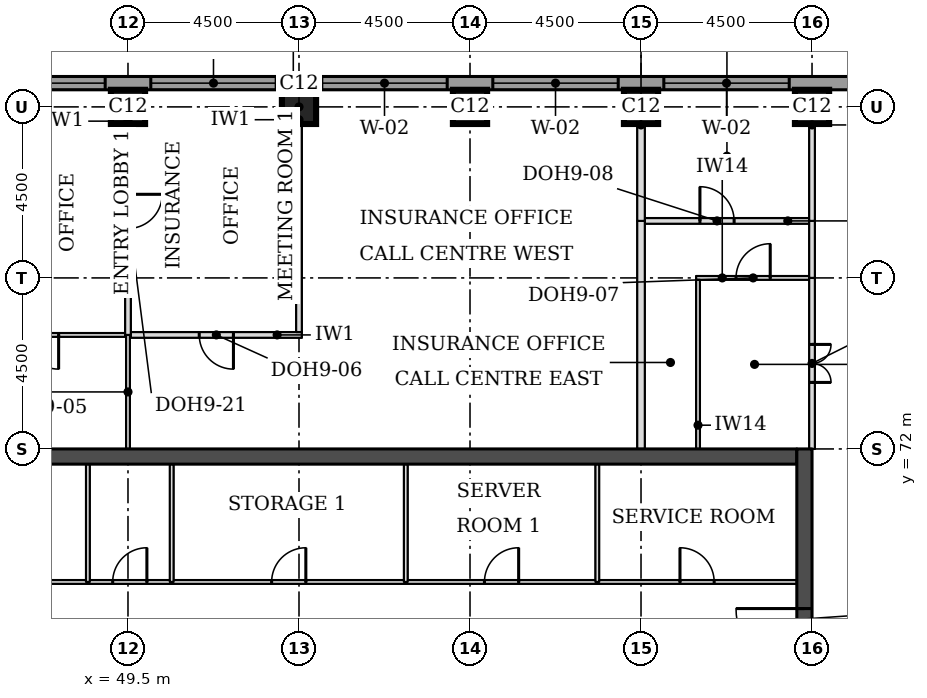
"""IFC4 building model, lengths in metres.
Left out: names, types, materials, properties, quantities, classifications, styles, units other than length and angle.
Written with IfcOpenShell. Run it as: python <this file> out.ifc"""

import sys

from ifc_helpers import new_model, si_unit, direction, frame, frame_2d, origin, origin_2d, place, context, subcontext, project, spatial, rectangle, extrude, element, fill, save


model = new_model("IFC4")
c1 = context("Model", 3, precision=1e-05, world=origin(), true_north=direction((0.0, 1.0)))
c2 = subcontext(c1, "Body", "Model", "MODEL_VIEW")
j1 = project(units=[si_unit("LENGTHUNIT", "METRE"), si_unit("PLANEANGLEUNIT", "RADIAN")], contexts=[c1])
p1 = place(None, origin())
s1 = spatial("IfcSite", under=j1, at=p1, CompositionType="ELEMENT")
p2 = place(p1, origin())
s2 = spatial("IfcBuilding", under=s1, at=p2, CompositionType="ELEMENT")
p3 = place(p2, frame((0.0, 0.0, 219.3)))
s3 = spatial("IfcBuildingStorey", under=s2, at=p3, CompositionType="ELEMENT", Elevation=219.3)
for number, where, z_axis, x_axis in (
    (1, (49.5, 81.0, 0.0), (0.0, 0.0, 1.0), (1.0, 0.0, 0.0)),
    (2, (54.0, 81.0, 0.0), (0.0, 0.0, 1.0), (1.0, 0.0, 0.0)),
    (3, (58.5, 81.0, 0.0), (0.0, 0.0, 1.0), (1.0, 0.0, 0.0)),
    (4, (63.0, 81.0, 0.0), (0.0, 0.0, 1.0), (1.0, 0.0, 0.0)),
    (5, (67.5, 81.0, 0.0), (0.0, 0.0, 1.0), (1.0, 0.0, 0.0)),
):
    element("IfcColumn", number, at=place(p3, frame(where, z_axis=z_axis, x_axis=x_axis)), inside=s3, PredefinedType="COLUMN", context=c2, shape_type="SweptSolid", body=[
        extrude(rectangle(XDim=0.9, YDim=0.9, at=origin_2d()), origin(), (0.0, 0.0, 1.0), 3.7),
    ])
p4 = place(p3, frame((45.4, 71.8, 0.0), z_axis=(0.0, 0.0, 1.0), x_axis=(1.0, 0.0, 0.0)))
e6 = element("IfcWall", 6, at=p4, inside=s3, PredefinedType="SHEAR", context=c2, shape_type="SweptSolid", body=[
    extrude(rectangle(XDim=21.7, YDim=0.4, at=frame_2d((10.85, 0.0))), origin(), (0.0, 0.0, 1.0), 3.7),
])
p5 = place(p3, frame((67.3, 49.5, 0.0), z_axis=(0.0, 0.0, 1.0), x_axis=(0.0, 1.0, 0.0)))
e7 = element("IfcWall", 7, at=p5, inside=s3, PredefinedType="SHEAR", context=c2, shape_type="SweptSolid", body=[
    extrude(rectangle(XDim=22.5, YDim=0.4, at=frame_2d((11.25, 0.0))), origin(), (0.0, 0.0, 1.0), 3.7),
])
p6 = place(p5, frame((4.2, 0.0, 0.0)))
e8 = element("IfcOpeningElement", 8, at=p6, cuts=e7, PredefinedType="OPENING", context=c2, shape_type="SweptSolid", body=[
    extrude(rectangle(XDim=1.8, YDim=2.1, at=frame_2d((0.9, 1.05))), frame((0.0, 0.21, 0.0), z_axis=(0.0, -1.0, 0.0), x_axis=(1.0, 0.0, 0.0)), (0.0, 0.0, 1.0), 0.42),
])
p7 = place(p5, frame((6.9, 0.0, 0.0)))
e9 = element("IfcOpeningElement", 9, at=p7, cuts=e7, PredefinedType="OPENING", context=c2, shape_type="SweptSolid", body=[
    extrude(rectangle(XDim=1.1, YDim=2.1, at=frame_2d((0.55, 1.05))), frame((0.0, 0.21, 0.0), z_axis=(0.0, -1.0, 0.0), x_axis=(1.0, 0.0, 0.0)), (0.0, 0.0, 1.0), 0.42),
])
p8 = place(p5, frame((13.6, 0.0, 0.0)))
e10 = element("IfcOpeningElement", 10, at=p8, cuts=e7, PredefinedType="OPENING", context=c2, shape_type="SweptSolid", body=[
    extrude(rectangle(XDim=1.1, YDim=2.1, at=frame_2d((0.55, 1.05))), frame((0.0, 0.21, 0.0), z_axis=(0.0, -1.0, 0.0), x_axis=(1.0, 0.0, 0.0)), (0.0, 0.0, 1.0), 0.42),
])
p9 = place(p5, frame((16.5, 0.0, 0.0)))
e11 = element("IfcOpeningElement", 11, at=p9, cuts=e7, PredefinedType="OPENING", context=c2, shape_type="SweptSolid", body=[
    extrude(rectangle(XDim=1.8, YDim=2.1, at=frame_2d((0.9, 1.05))), frame((0.0, 0.21, 0.0), z_axis=(0.0, -1.0, 0.0), x_axis=(1.0, 0.0, 0.0)), (0.0, 0.0, 1.0), 0.42),
])
p10 = place(p3, frame((72.331, 81.625, 0.0), z_axis=(0.0, 0.0, 1.0), x_axis=(-1.0, 0.0, 0.0)))
e12 = element("IfcWall", 12, at=p10, inside=s3, PredefinedType="STANDARD", context=c2, shape_type="SweptSolid", body=[
    extrude(rectangle(XDim=32.163, YDim=0.35, at=frame_2d((16.081, 0.0))), origin(), (0.0, 0.0, 1.0), 3.525),
])
p11 = place(p10, frame((5.431, 0.0, 0.9)))
e13 = element("IfcOpeningElement", 13, at=p11, cuts=e12, PredefinedType="OPENING", context=c2, shape_type="SweptSolid", body=[
    extrude(rectangle(XDim=3.3, YDim=1.9, at=frame_2d((1.65, 0.95))), frame((0.0, 0.185, 0.0), z_axis=(0.0, -1.0, 0.0), x_axis=(1.0, 0.0, 0.0)), (0.0, 0.0, 1.0), 0.37),
])
p12 = place(p10, frame((9.931, 0.0, 0.9)))
e14 = element("IfcOpeningElement", 14, at=p12, cuts=e12, PredefinedType="OPENING", context=c2, shape_type="SweptSolid", body=[
    extrude(rectangle(XDim=3.3, YDim=1.9, at=frame_2d((1.65, 0.95))), frame((0.0, 0.185, 0.0), z_axis=(0.0, -1.0, 0.0), x_axis=(1.0, 0.0, 0.0)), (0.0, 0.0, 1.0), 0.37),
])
p13 = place(p10, frame((14.431, 0.0, 0.9)))
e15 = element("IfcOpeningElement", 15, at=p13, cuts=e12, PredefinedType="OPENING", context=c2, shape_type="SweptSolid", body=[
    extrude(rectangle(XDim=3.3, YDim=1.9, at=frame_2d((1.65, 0.95))), frame((0.0, 0.185, 0.0), z_axis=(0.0, -1.0, 0.0), x_axis=(1.0, 0.0, 0.0)), (0.0, 0.0, 1.0), 0.37),
])
p14 = place(p10, frame((18.931, 0.0, 0.9)))
e16 = element("IfcOpeningElement", 16, at=p14, cuts=e12, PredefinedType="OPENING", context=c2, shape_type="SweptSolid", body=[
    extrude(rectangle(XDim=3.3, YDim=1.9, at=frame_2d((1.65, 0.95))), frame((0.0, 0.185, 0.0), z_axis=(0.0, -1.0, 0.0), x_axis=(1.0, 0.0, 0.0)), (0.0, 0.0, 1.0), 0.37),
])
p15 = place(p10, frame((23.431, 0.0, 0.9)))
e17 = element("IfcOpeningElement", 17, at=p15, cuts=e12, PredefinedType="OPENING", context=c2, shape_type="SweptSolid", body=[
    extrude(rectangle(XDim=3.3, YDim=1.9, at=frame_2d((1.65, 0.95))), frame((0.0, 0.185, 0.0), z_axis=(0.0, -1.0, 0.0), x_axis=(1.0, 0.0, 0.0)), (0.0, 0.0, 1.0), 0.37),
])
p16 = place(p3, frame((45.075, 75.0, 0.0), z_axis=(0.0, 0.0, 1.0), x_axis=(1.0, 0.0, 0.0)))
e18 = element("IfcWall", 18, at=p16, inside=s3, PredefinedType="PARTITIONING", context=c2, shape_type="SweptSolid", body=[
    extrude(rectangle(XDim=4.35, YDim=0.1, at=frame_2d((2.175, 0.0))), origin(), (0.0, 0.0, 1.0), 3.55),
])
p17 = place(p16, frame((1.7, 0.0, 0.0)))
e19 = element("IfcOpeningElement", 19, at=p17, cuts=e18, PredefinedType="OPENING", context=c2, shape_type="SweptSolid", body=[
    extrude(rectangle(XDim=0.9, YDim=2.1, at=frame_2d((0.45, 1.05))), frame((0.0, 0.06, 0.0), z_axis=(0.0, -1.0, 0.0), x_axis=(1.0, 0.0, 0.0)), (0.0, 0.0, 1.0), 0.12),
])
p18 = place(p3, frame((49.575, 75.0, 0.0), z_axis=(0.0, 0.0, 1.0), x_axis=(1.0, 0.0, 0.0)))
e20 = element("IfcWall", 20, at=p18, inside=s3, PredefinedType="PARTITIONING", context=c2, shape_type="SweptSolid", body=[
    extrude(rectangle(XDim=4.5, YDim=0.15, at=frame_2d((2.25, 0.0))), origin(), (0.0, 0.0, 1.0), 3.55),
])
p19 = place(p18, frame((1.8, 0.0, 0.0)))
e21 = element("IfcOpeningElement", 21, at=p19, cuts=e20, PredefinedType="OPENING", context=c2, shape_type="SweptSolid", body=[
    extrude(rectangle(XDim=0.9, YDim=2.1, at=frame_2d((0.45, 1.05))), frame((0.0, 0.085, 0.0), z_axis=(0.0, -1.0, 0.0), x_axis=(1.0, 0.0, 0.0)), (0.0, 0.0, 1.0), 0.17),
])
p20 = place(p3, frame((64.45, 76.5, 0.0), z_axis=(0.0, 0.0, 1.0), x_axis=(1.0, 0.0, 0.0)))
e22 = element("IfcWall", 22, at=p20, inside=s3, PredefinedType="PARTITIONING", context=c2, shape_type="SweptSolid", body=[
    extrude(rectangle(XDim=2.975, YDim=0.1, at=frame_2d((1.488, 0.0))), origin(), (0.0, 0.0, 1.0), 3.55),
])
p21 = place(p20, frame((1.05, 0.0, 0.0)))
e23 = element("IfcOpeningElement", 23, at=p21, cuts=e22, PredefinedType="OPENING", context=c2, shape_type="SweptSolid", body=[
    extrude(rectangle(XDim=0.9, YDim=2.1, at=frame_2d((0.45, 1.05))), frame((0.0, 0.06, 0.0), z_axis=(0.0, -1.0, 0.0), x_axis=(1.0, 0.0, 0.0)), (0.0, 0.0, 1.0), 0.12),
])
p22 = place(p3, frame((63.1, 78.0, 0.0), z_axis=(0.0, 0.0, 1.0), x_axis=(1.0, 0.0, 0.0)))
e24 = element("IfcWall", 24, at=p22, inside=s3, PredefinedType="PARTITIONING", context=c2, shape_type="SweptSolid", body=[
    extrude(rectangle(XDim=4.325, YDim=0.15, at=frame_2d((2.163, 0.0))), origin(), (0.0, 0.0, 1.0), 3.55),
])
p23 = place(p22, frame((1.45, 0.0, 0.0)))
e25 = element("IfcOpeningElement", 25, at=p23, cuts=e24, PredefinedType="OPENING", context=c2, shape_type="SweptSolid", body=[
    extrude(rectangle(XDim=0.9, YDim=2.1, at=frame_2d((0.45, 1.05))), frame((0.0, 0.085, 0.0), z_axis=(0.0, -1.0, 0.0), x_axis=(1.0, 0.0, 0.0)), (0.0, 0.0, 1.0), 0.17),
])
p24 = place(p3, frame((49.5, 72.0, 0.0), z_axis=(0.0, 0.0, 1.0), x_axis=(0.0, 1.0, 0.0)))
e26 = element("IfcWall", 26, at=p24, inside=s3, PredefinedType="PARTITIONING", context=c2, shape_type="SweptSolid", body=[
    extrude(rectangle(XDim=3.0, YDim=0.1, at=frame_2d((1.5, 0.0))), origin(), (0.0, 0.0, 1.0), 3.55),
])
p25 = place(p3, frame((63.0, 72.0, 0.0), z_axis=(0.0, 0.0, 1.0), x_axis=(0.0, 1.0, 0.0)))
e27 = element("IfcWall", 27, at=p25, inside=s3, PredefinedType="PARTITIONING", context=c2, shape_type="SweptSolid", body=[
    extrude(rectangle(XDim=6.0, YDim=0.2, at=frame_2d((3.0, 0.0))), origin(), (0.0, 0.0, 1.0), 3.55),
])
p26 = place(p3, frame((64.5, 72.0, 0.0), z_axis=(0.0, 0.0, 1.0), x_axis=(0.0, 1.0, 0.0)))
e28 = element("IfcWall", 28, at=p26, inside=s3, PredefinedType="PARTITIONING", context=c2, shape_type="SweptSolid", body=[
    extrude(rectangle(XDim=4.45, YDim=0.1, at=frame_2d((2.225, 0.0))), origin(), (0.0, 0.0, 1.0), 3.55),
])
p27 = place(p3, frame((67.5, 72.0, 0.0), z_axis=(0.0, 0.0, 1.0), x_axis=(0.0, 1.0, 0.0)))
e29 = element("IfcWall", 29, at=p27, inside=s3, PredefinedType="PARTITIONING", context=c2, shape_type="SweptSolid", body=[
    extrude(rectangle(XDim=4.5, YDim=0.15, at=frame_2d((2.25, 0.0))), origin(), (0.0, 0.0, 1.0), 3.022),
])
p28 = place(p27, frame((1.75, 0.0, 0.0)))
e30 = element("IfcOpeningElement", 30, at=p28, cuts=e29, PredefinedType="OPENING", context=c2, shape_type="SweptSolid", body=[
    extrude(rectangle(XDim=1.0, YDim=2.1, at=frame_2d((0.5, 1.05))), frame((0.0, 0.085, 0.0), z_axis=(0.0, -1.0, 0.0), x_axis=(1.0, 0.0, 0.0)), (0.0, 0.0, 1.0), 0.17),
])
p29 = place(p3, frame((49.5, 75.0, 0.0), z_axis=(0.0, 0.0, 1.0), x_axis=(0.0, 1.0, 0.0)))
e31 = element("IfcWall", 31, at=p29, inside=s3, PredefinedType="PARTITIONING", context=c2, shape_type="SweptSolid", body=[
    extrude(rectangle(XDim=6.45, YDim=0.15, at=frame_2d((3.225, 0.0))), origin(), (0.0, 0.0, 1.0), 3.55),
])
p30 = place(p29, frame((2.8, 0.0, 0.0)))
e32 = element("IfcOpeningElement", 32, at=p30, cuts=e31, PredefinedType="OPENING", context=c2, shape_type="SweptSolid", body=[
    extrude(rectangle(XDim=0.9, YDim=2.1, at=frame_2d((0.45, 1.05))), frame((0.0, 0.085, 0.0), z_axis=(0.0, -1.0, 0.0), x_axis=(1.0, 0.0, 0.0)), (0.0, 0.0, 1.0), 0.17),
])
p31 = place(p3, frame((54.0, 75.075, 0.0), z_axis=(0.0, 0.0, 1.0), x_axis=(0.0, 1.0, 0.0)))
e33 = element("IfcWall", 33, at=p31, inside=s3, PredefinedType="PARTITIONING", context=c2, shape_type="SweptSolid", body=[
    extrude(rectangle(XDim=6.375, YDim=0.15, at=frame_2d((3.188, 0.0))), origin(), (0.0, 0.0, 1.0), 3.55),
])
p32 = place(p3, frame((67.5, 76.5, 0.0), z_axis=(0.0, 0.0, 1.0), x_axis=(0.0, 1.0, 0.0)))
e34 = element("IfcWall", 34, at=p32, inside=s3, PredefinedType="PARTITIONING", context=c2, shape_type="SweptSolid", body=[
    extrude(rectangle(XDim=1.5, YDim=0.15, at=frame_2d((0.75, 0.0))), origin(), (0.0, 0.0, 1.0), 3.022),
])
p33 = place(p3, frame((63.0, 78.0, 0.0), z_axis=(0.0, 0.0, 1.0), x_axis=(0.0, 1.0, 0.0)))
e35 = element("IfcWall", 35, at=p33, inside=s3, PredefinedType="PARTITIONING", context=c2, shape_type="SweptSolid", body=[
    extrude(rectangle(XDim=3.45, YDim=0.2, at=frame_2d((1.725, 0.0))), origin(), (0.0, 0.0, 1.0), 3.55),
])
p34 = place(p3, frame((67.5, 78.0, 0.0), z_axis=(0.0, 0.0, 1.0), x_axis=(0.0, 1.0, 0.0)))
e36 = element("IfcWall", 36, at=p34, inside=s3, PredefinedType="PARTITIONING", context=c2, shape_type="SweptSolid", body=[
    extrude(rectangle(XDim=3.45, YDim=0.15, at=frame_2d((1.725, 0.0))), origin(), (0.0, 0.0, 1.0), 3.022),
])
p35 = place(p3, frame((45.4, 68.5, 0.0), z_axis=(0.0, 0.0, 1.0), x_axis=(1.0, 0.0, 0.0)))
e37 = element("IfcWall", 37, at=p35, inside=s3, PredefinedType="PARTITIONING", context=c2, shape_type="SweptSolid", body=[
    extrude(rectangle(XDim=21.7, YDim=0.1, at=frame_2d((10.85, 0.0))), origin(), (0.0, 0.0, 1.0), 3.55),
])
p36 = place(p35, frame((18.625, 0.0, 0.0)))
e38 = element("IfcOpeningElement", 38, at=p36, cuts=e37, PredefinedType="OPENING", context=c2, shape_type="SweptSolid", body=[
    extrude(rectangle(XDim=0.9, YDim=2.1, at=frame_2d((0.45, 1.05))), frame((0.0, 0.06, 0.0), z_axis=(0.0, -1.0, 0.0), x_axis=(1.0, 0.0, 0.0)), (0.0, 0.0, 1.0), 0.12),
])
p37 = place(p35, frame((1.073, 0.0, 0.0)))
e39 = element("IfcOpeningElement", 39, at=p37, cuts=e37, PredefinedType="OPENING", context=c2, shape_type="SweptSolid", body=[
    extrude(rectangle(XDim=0.9, YDim=2.1, at=frame_2d((0.45, 1.05))), frame((0.0, 0.06, 0.0), z_axis=(0.0, -1.0, 0.0), x_axis=(1.0, 0.0, 0.0)), (0.0, 0.0, 1.0), 0.12),
])
p38 = place(p35, frame((3.698, 0.0, 0.0)))
e40 = element("IfcOpeningElement", 40, at=p38, cuts=e37, PredefinedType="OPENING", context=c2, shape_type="SweptSolid", body=[
    extrude(rectangle(XDim=0.9, YDim=2.1, at=frame_2d((0.45, 1.05))), frame((0.0, 0.06, 0.0), z_axis=(0.0, -1.0, 0.0), x_axis=(1.0, 0.0, 0.0)), (0.0, 0.0, 1.0), 0.12),
])
p39 = place(p35, frame((13.48, 0.0, 0.0)))
e41 = element("IfcOpeningElement", 41, at=p39, cuts=e37, PredefinedType="OPENING", context=c2, shape_type="SweptSolid", body=[
    extrude(rectangle(XDim=0.9, YDim=2.1, at=frame_2d((0.45, 1.05))), frame((0.0, 0.06, 0.0), z_axis=(0.0, -1.0, 0.0), x_axis=(1.0, 0.0, 0.0)), (0.0, 0.0, 1.0), 0.12),
])
p40 = place(p35, frame((7.88, 0.0, 0.0)))
e42 = element("IfcOpeningElement", 42, at=p40, cuts=e37, PredefinedType="OPENING", context=c2, shape_type="SweptSolid", body=[
    extrude(rectangle(XDim=0.9, YDim=2.1, at=frame_2d((0.45, 1.05))), frame((0.0, 0.06, 0.0), z_axis=(0.0, -1.0, 0.0), x_axis=(1.0, 0.0, 0.0)), (0.0, 0.0, 1.0), 0.12),
])
for number, where, z_axis, x_axis in (
    (43, (48.445, 68.5, 0.0), (0.0, 0.0, 1.0), (0.0, 1.0, 0.0)),
    (44, (50.65, 68.5, 0.0), (0.0, 0.0, 1.0), (0.0, 1.0, 0.0)),
    (45, (56.81, 68.5, 0.0), (0.0, 0.0, 1.0), (0.0, 1.0, 0.0)),
    (46, (61.85, 68.5, 0.0), (0.0, 0.0, 1.0), (0.0, 1.0, 0.0)),
):
    element("IfcWall", number, at=place(p3, frame(where, z_axis=z_axis, x_axis=x_axis)), inside=s3, PredefinedType="PARTITIONING", context=c2, shape_type="SweptSolid", body=[
        extrude(rectangle(XDim=3.1, YDim=0.1, at=frame_2d((1.55, 0.0))), origin(), (0.0, 0.0, 1.0), 3.55),
    ])
p41 = place(p11, origin())
e47 = element("IfcWindow", 47, at=p41, inside=s3, PartitioningType="SINGLE_PANEL", PredefinedType="WINDOW", context=c2, shape_type="SweptSolid", body=[
    extrude(rectangle(XDim=3.3, YDim=1.9, at=frame_2d((1.65, 0.95))), frame((0.0, 0.085, 0.0), z_axis=(0.0, -1.0, 0.0), x_axis=(1.0, 0.0, 0.0)), (0.0, 0.0, 1.0), 0.06),
])
fill(e13, e47)
p42 = place(p12, origin())
e48 = element("IfcWindow", 48, at=p42, inside=s3, PartitioningType="SINGLE_PANEL", PredefinedType="WINDOW", context=c2, shape_type="SweptSolid", body=[
    extrude(rectangle(XDim=3.3, YDim=1.9, at=frame_2d((1.65, 0.95))), frame((0.0, 0.085, 0.0), z_axis=(0.0, -1.0, 0.0), x_axis=(1.0, 0.0, 0.0)), (0.0, 0.0, 1.0), 0.06),
])
fill(e14, e48)
p43 = place(p13, origin())
e49 = element("IfcWindow", 49, at=p43, inside=s3, PartitioningType="SINGLE_PANEL", PredefinedType="WINDOW", context=c2, shape_type="SweptSolid", body=[
    extrude(rectangle(XDim=3.3, YDim=1.9, at=frame_2d((1.65, 0.95))), frame((0.0, 0.085, 0.0), z_axis=(0.0, -1.0, 0.0), x_axis=(1.0, 0.0, 0.0)), (0.0, 0.0, 1.0), 0.06),
])
fill(e15, e49)
p44 = place(p14, origin())
e50 = element("IfcWindow", 50, at=p44, inside=s3, PartitioningType="SINGLE_PANEL", PredefinedType="WINDOW", context=c2, shape_type="SweptSolid", body=[
    extrude(rectangle(XDim=3.3, YDim=1.9, at=frame_2d((1.65, 0.95))), frame((0.0, 0.085, 0.0), z_axis=(0.0, -1.0, 0.0), x_axis=(1.0, 0.0, 0.0)), (0.0, 0.0, 1.0), 0.06),
])
fill(e16, e50)
p45 = place(p15, origin())
e51 = element("IfcWindow", 51, at=p45, inside=s3, PartitioningType="SINGLE_PANEL", PredefinedType="WINDOW", context=c2, shape_type="SweptSolid", body=[
    extrude(rectangle(XDim=3.3, YDim=1.9, at=frame_2d((1.65, 0.95))), frame((0.0, 0.085, 0.0), z_axis=(0.0, -1.0, 0.0), x_axis=(1.0, 0.0, 0.0)), (0.0, 0.0, 1.0), 0.06),
])
fill(e17, e51)
p46 = place(p30, frame((0.9, 0.0, 0.0), z_axis=(0.0, 0.0, 1.0), x_axis=(-1.0, 0.0, 0.0)))
e52 = element("IfcDoor", 52, at=p46, inside=s3, OperationType="SINGLE_SWING_LEFT", PredefinedType="DOOR", context=c2, shape_type="SweptSolid", body=[
    extrude(rectangle(XDim=0.9, YDim=2.1, at=frame_2d((0.45, 1.05))), frame((0.0, 0.025, 0.0), z_axis=(0.0, -1.0, 0.0), x_axis=(1.0, 0.0, 0.0)), (0.0, 0.0, 1.0), 0.05),
])
fill(e32, e52)
p47 = place(p17, frame((0.9, 0.0, 0.0), z_axis=(0.0, 0.0, 1.0), x_axis=(-1.0, 0.0, 0.0)))
e53 = element("IfcDoor", 53, at=p47, inside=s3, OperationType="SINGLE_SWING_LEFT", PredefinedType="DOOR", context=c2, shape_type="SweptSolid", body=[
    extrude(rectangle(XDim=0.9, YDim=2.1, at=frame_2d((0.45, 1.05))), frame((0.0, 0.025, 0.0), z_axis=(0.0, -1.0, 0.0), x_axis=(1.0, 0.0, 0.0)), (0.0, 0.0, 1.0), 0.05),
])
fill(e19, e53)
p48 = place(p19, frame((0.9, 0.0, 0.0), z_axis=(0.0, 0.0, 1.0), x_axis=(-1.0, 0.0, 0.0)))
e54 = element("IfcDoor", 54, at=p48, inside=s3, OperationType="SINGLE_SWING_LEFT", PredefinedType="DOOR", context=c2, shape_type="SweptSolid", body=[
    extrude(rectangle(XDim=0.9, YDim=2.1, at=frame_2d((0.45, 1.05))), frame((0.0, 0.025, 0.0), z_axis=(0.0, -1.0, 0.0), x_axis=(1.0, 0.0, 0.0)), (0.0, 0.0, 1.0), 0.05),
])
fill(e21, e54)
p49 = place(p28, frame((1.0, 0.0, 0.0), z_axis=(0.0, 0.0, 1.0), x_axis=(-1.0, 0.0, 0.0)))
e55 = element("IfcDoor", 55, at=p49, inside=s3, OperationType="DOUBLE_DOOR_SINGLE_SWING", PredefinedType="DOOR", context=c2, shape_type="SweptSolid", body=[
    extrude(rectangle(XDim=1.0, YDim=2.1, at=frame_2d((0.5, 1.05))), frame((0.0, 0.025, 0.0), z_axis=(0.0, -1.0, 0.0), x_axis=(1.0, 0.0, 0.0)), (0.0, 0.0, 1.0), 0.05),
])
fill(e30, e55)
p50 = place(p21, origin())
e56 = element("IfcDoor", 56, at=p50, inside=s3, OperationType="SINGLE_SWING_RIGHT", PredefinedType="DOOR", context=c2, shape_type="SweptSolid", body=[
    extrude(rectangle(XDim=0.9, YDim=2.1, at=frame_2d((0.45, 1.05))), frame((0.0, 0.025, 0.0), z_axis=(0.0, -1.0, 0.0), x_axis=(1.0, 0.0, 0.0)), (0.0, 0.0, 1.0), 0.05),
])
fill(e23, e56)
p51 = place(p23, origin())
e57 = element("IfcDoor", 57, at=p51, inside=s3, OperationType="SINGLE_SWING_LEFT", PredefinedType="DOOR", context=c2, shape_type="SweptSolid", body=[
    extrude(rectangle(XDim=0.9, YDim=2.1, at=frame_2d((0.45, 1.05))), frame((0.0, 0.025, 0.0), z_axis=(0.0, -1.0, 0.0), x_axis=(1.0, 0.0, 0.0)), (0.0, 0.0, 1.0), 0.05),
])
fill(e25, e57)
p52 = place(p9, origin())
e58 = element("IfcDoor", 58, at=p52, inside=s3, OperationType="SINGLE_SWING_RIGHT", PredefinedType="DOOR", context=c2, shape_type="SweptSolid", body=[
    extrude(rectangle(XDim=1.8, YDim=2.1, at=frame_2d((0.9, 1.05))), frame((0.0, 0.025, 0.0), z_axis=(0.0, -1.0, 0.0), x_axis=(1.0, 0.0, 0.0)), (0.0, 0.0, 1.0), 0.05),
])
fill(e11, e58)
p53 = place(p36, origin())
e59 = element("IfcDoor", 59, at=p53, inside=s3, OperationType="SINGLE_SWING_LEFT", PredefinedType="DOOR", context=c2, shape_type="SweptSolid", body=[
    extrude(rectangle(XDim=0.9, YDim=2.1, at=frame_2d((0.45, 1.05))), frame((0.0, 0.025, 0.0), z_axis=(0.0, -1.0, 0.0), x_axis=(1.0, 0.0, 0.0)), (0.0, 0.0, 1.0), 0.05),
])
fill(e38, e59)
p54 = place(p38, origin())
e60 = element("IfcDoor", 60, at=p54, inside=s3, OperationType="SINGLE_SWING_RIGHT", PredefinedType="DOOR", context=c2, shape_type="SweptSolid", body=[
    extrude(rectangle(XDim=0.9, YDim=2.1, at=frame_2d((0.45, 1.05))), frame((0.0, 0.025, 0.0), z_axis=(0.0, -1.0, 0.0), x_axis=(1.0, 0.0, 0.0)), (0.0, 0.0, 1.0), 0.05),
])
fill(e40, e60)
p55 = place(p39, origin())
e61 = element("IfcDoor", 61, at=p55, inside=s3, OperationType="SINGLE_SWING_RIGHT", PredefinedType="DOOR", context=c2, shape_type="SweptSolid", body=[
    extrude(rectangle(XDim=0.9, YDim=2.1, at=frame_2d((0.45, 1.05))), frame((0.0, 0.025, 0.0), z_axis=(0.0, -1.0, 0.0), x_axis=(1.0, 0.0, 0.0)), (0.0, 0.0, 1.0), 0.05),
])
fill(e41, e61)
p56 = place(p40, origin())
e62 = element("IfcDoor", 62, at=p56, inside=s3, OperationType="SINGLE_SWING_RIGHT", PredefinedType="DOOR", context=c2, shape_type="SweptSolid", body=[
    extrude(rectangle(XDim=0.9, YDim=2.1, at=frame_2d((0.45, 1.05))), frame((0.0, 0.025, 0.0), z_axis=(0.0, -1.0, 0.0), x_axis=(1.0, 0.0, 0.0)), (0.0, 0.0, 1.0), 0.05),
])
fill(e42, e62)
save(model, sys.argv[1])
